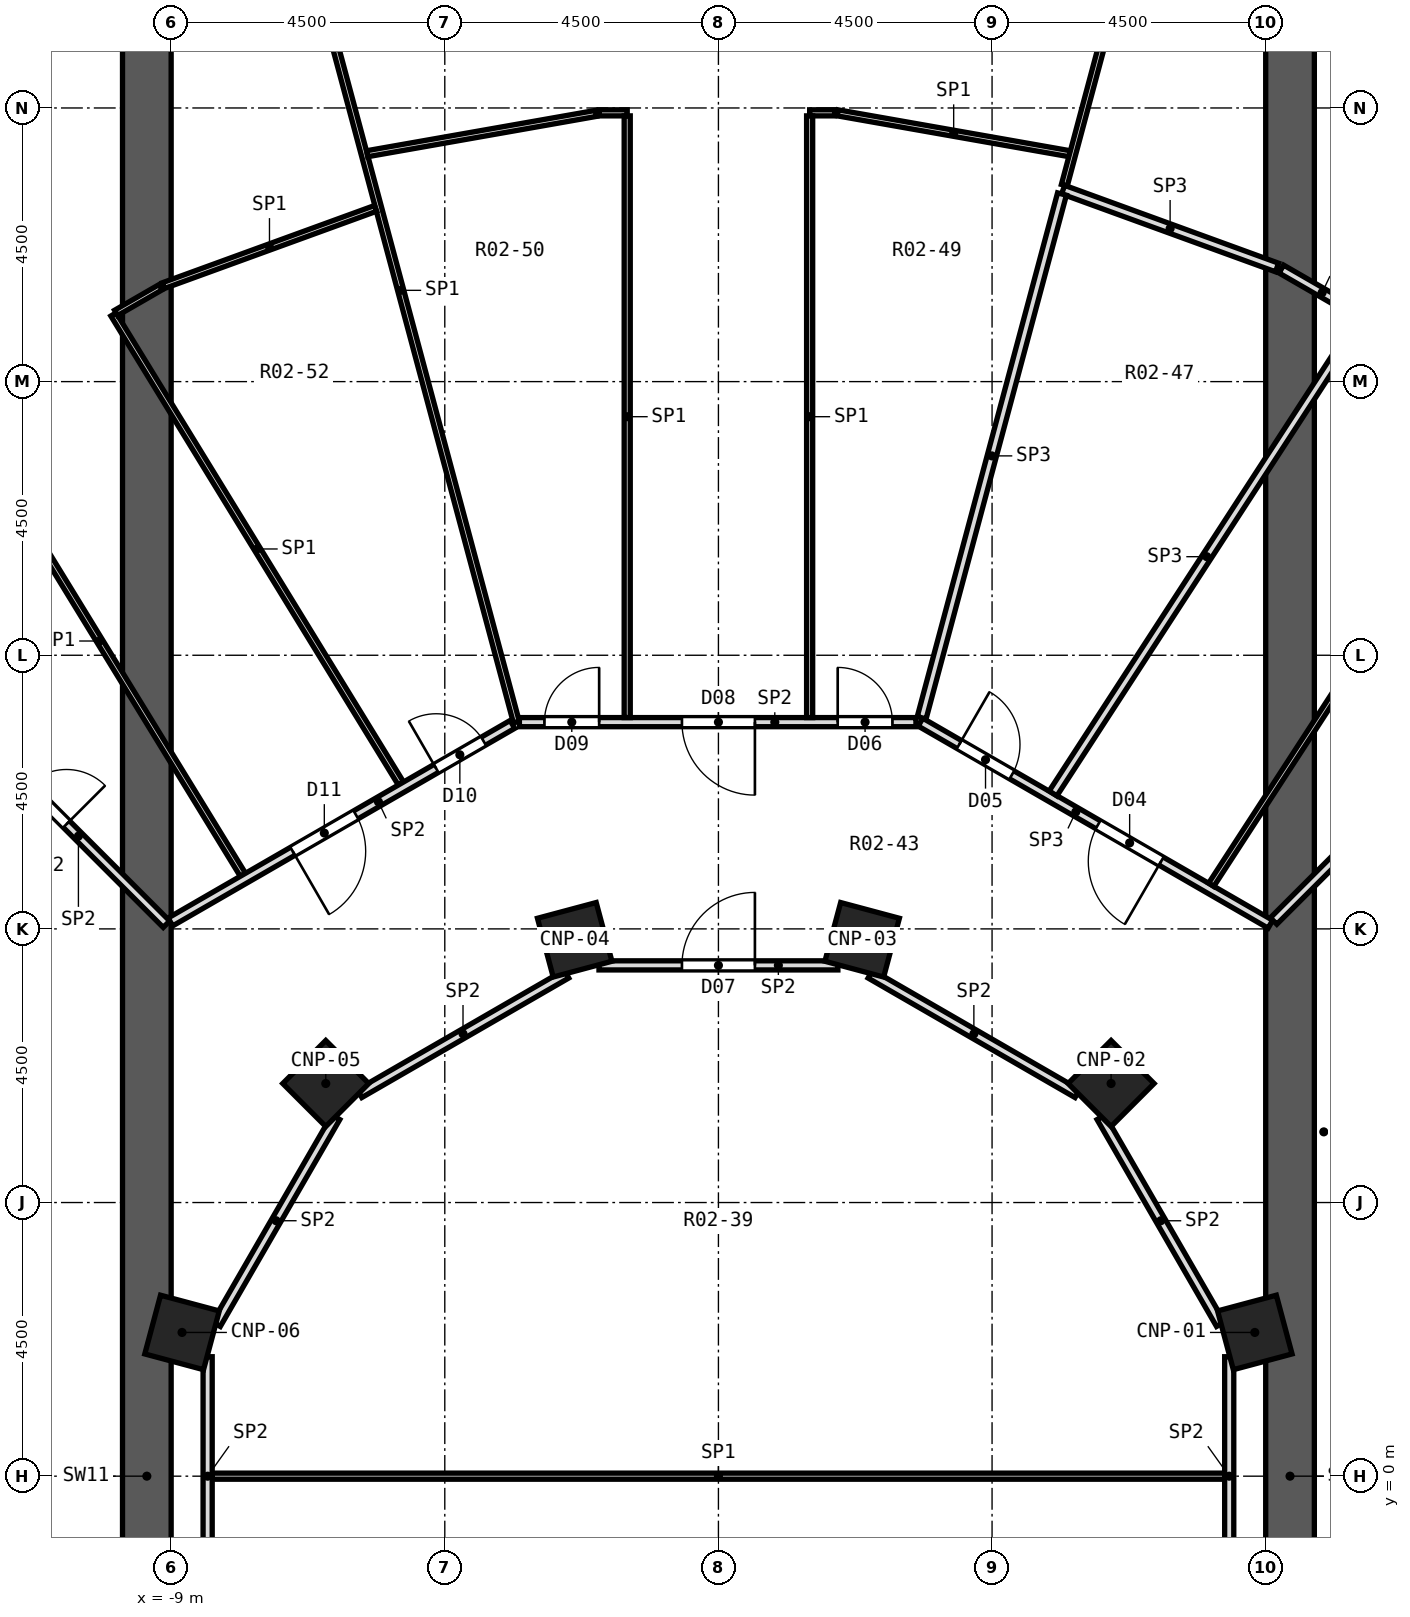
"""IFC4 building model, lengths in metres.
Left out: names, types, materials, properties, quantities, classifications, styles, units other than length and angle.
Written with IfcOpenShell. Run it as: python <this file> out.ifc"""

import sys

from ifc_helpers import new_model, si_unit, direction, frame, frame_2d, origin, origin_2d, place, context, subcontext, project, spatial, rectangle, extrude, element, fill, save


model = new_model("IFC4")
c1 = context("Model", 3, precision=1e-05, world=origin(), true_north=direction((0.0, 1.0)))
c2 = subcontext(c1, "Body", "Model", "MODEL_VIEW")
j1 = project(units=[si_unit("LENGTHUNIT", "METRE"), si_unit("PLANEANGLEUNIT", "RADIAN")], contexts=[c1])
p1 = place(None, origin())
s1 = spatial("IfcSite", under=j1, at=p1, CompositionType="ELEMENT")
p2 = place(p1, origin())
s2 = spatial("IfcBuilding", under=s1, at=p2, CompositionType="ELEMENT")
p3 = place(p2, frame((0.0, 0.0, -4.5)))
s3 = spatial("IfcBuildingStorey", under=s2, at=p3, CompositionType="ELEMENT", Elevation=-4.5)
for number, where, z_axis, x_axis in (
    (1, (8.821, 2.364, 0.0), (0.0, 0.0, 1.0), (0.966, 0.259, 0.0)),
    (2, (6.458, 6.458, 0.0), (0.0, 0.0, 1.0), (0.707, 0.707, 0.0)),
    (3, (2.364, 8.821, 0.0), (0.0, 0.0, 1.0), (0.259, 0.966, 0.0)),
    (4, (-2.364, 8.821, 0.0), (0.0, 0.0, 1.0), (-0.259, 0.966, 0.0)),
    (5, (-6.458, 6.458, 0.0), (0.0, 0.0, 1.0), (-0.707, 0.707, 0.0)),
    (6, (-8.821, 2.364, 0.0), (0.0, 0.0, 1.0), (-0.966, 0.259, 0.0)),
):
    element("IfcColumn", number, at=place(p3, frame(where, z_axis=z_axis, x_axis=x_axis)), inside=s3, PredefinedType="COLUMN", context=c2, shape_type="SweptSolid", body=[
        extrude(rectangle(XDim=1.0, YDim=1.0, at=origin_2d()), origin(), (0.0, 0.0, 1.0), 4.5),
    ])
for number, where, z_axis, x_axis in (
    (7, (9.4, -27.077, 0.0), (0.0, 0.0, 1.0), (0.0, 1.0, 0.0)),
    (8, (-9.4, -27.077, 0.0), (0.0, 0.0, 1.0), (0.0, 1.0, 0.0)),
):
    element("IfcWall", number, at=place(p3, frame(where, z_axis=z_axis, x_axis=x_axis)), inside=s3, PredefinedType="SHEAR", context=c2, shape_type="SweptSolid", body=[
        extrude(rectangle(XDim=54.154, YDim=0.8, at=frame_2d((27.077, 0.0))), origin(), (0.0, 0.0, 1.0), 4.5),
    ])
p4 = place(p3, frame((-7.128, 26.602, 0.0), z_axis=(0.0, 0.0, 1.0), x_axis=(0.258778692841, -0.965936637742, 0.0)))
e9 = element("IfcWall", 9, at=p4, inside=s3, PredefinedType="PARTITIONING", context=c2, shape_type="SweptSolid", body=[
    extrude(rectangle(XDim=14.702, YDim=0.1, at=frame_2d((7.351, 0.0))), origin(), (0.0, 0.0, 1.0), 3.95),
])
p5 = place(p3, frame((6.292, 5.902, 0.0), z_axis=(0.0, 0.0, 1.0), x_axis=(0.500061252887, -0.865990036525, 0.0)))
e10 = element("IfcWall", 10, at=p5, inside=s3, PredefinedType="PARTITIONING", context=c2, shape_type="SweptSolid", body=[
    extrude(rectangle(XDim=3.93, YDim=0.15, at=frame_2d((1.965, 0.0))), origin(), (0.0, 0.0, 1.0), 3.95),
])
p6 = place(p3, frame((-12.531, 17.578, 0.0), z_axis=(0.0, 0.0, 1.0), x_axis=(0.522457288025, -0.852665457368, 0.0)))
e11 = element("IfcWall", 11, at=p6, inside=s3, PredefinedType="PARTITIONING", context=c2, shape_type="SweptSolid", body=[
    extrude(rectangle(XDim=9.016, YDim=0.1, at=frame_2d((4.508, 0.0))), origin(), (0.0, 0.0, 1.0), 3.95),
])
p7 = place(p3, frame((-9.949, 19.105, 0.0), z_axis=(0.0, 0.0, 1.0), x_axis=(0.522544340664, -0.852612111127, 0.0)))
e12 = element("IfcWall", 12, at=p7, inside=s3, PredefinedType="PARTITIONING", context=c2, shape_type="SweptSolid", body=[
    extrude(rectangle(XDim=9.048, YDim=0.1, at=frame_2d((4.524, 0.0))), origin(), (0.0, 0.0, 1.0), 3.95),
])
p8 = place(p3, frame((-12.965, 12.965, 0.0), z_axis=(0.0, 0.0, 1.0), x_axis=(0.707106781187, -0.707106781187, 0.0)))
e13 = element("IfcWall", 13, at=p8, inside=s3, PredefinedType="PARTITIONING", context=c2, shape_type="SweptSolid", body=[
    extrude(rectangle(XDim=5.498, YDim=0.15, at=frame_2d((2.749, 0.0))), origin(), (0.0, 0.0, 1.0), 3.95),
])
p9 = place(p8, frame((2.272, 0.0, 0.0)))
e14 = element("IfcOpeningElement", 14, at=p9, cuts=e13, PredefinedType="OPENING", context=c2, shape_type="SweptSolid", body=[
    extrude(rectangle(XDim=0.9, YDim=2.1, at=frame_2d((0.45, 1.05))), frame((0.0, 0.087, 0.0), z_axis=(0.0, -1.0, 0.0), x_axis=(1.0, 0.0, 0.0)), (0.0, 0.0, 1.0), 0.174),
])
p10 = place(p3, frame((2.499, 8.257, 0.0), z_axis=(0.0, 0.0, 1.0), x_axis=(0.865990036525, -0.500061252887, 0.0)))
e15 = element("IfcWall", 15, at=p10, inside=s3, PredefinedType="PARTITIONING", context=c2, shape_type="SweptSolid", body=[
    extrude(rectangle(XDim=3.93, YDim=0.15, at=frame_2d((1.965, 0.0))), origin(), (0.0, 0.0, 1.0), 3.95),
])
p11 = place(p3, frame((3.323, 12.4, 0.0), z_axis=(0.0, 0.0, 1.0), x_axis=(0.865961614908, -0.500110469302, 0.0)))
e16 = element("IfcWall", 16, at=p11, inside=s3, PredefinedType="PARTITIONING", context=c2, shape_type="SweptSolid", body=[
    extrude(rectangle(XDim=6.645, YDim=0.15, at=frame_2d((3.322, 0.0))), origin(), (0.0, 0.0, 1.0), 3.95),
])
p12 = place(p11, frame((3.372, 0.0, 0.0)))
e17 = element("IfcOpeningElement", 17, at=p12, cuts=e16, PredefinedType="OPENING", context=c2, shape_type="SweptSolid", body=[
    extrude(rectangle(XDim=1.2, YDim=2.1, at=frame_2d((0.6, 1.05))), frame((0.0, 0.087, 0.0), z_axis=(0.0, -1.0, 0.0), x_axis=(1.0, 0.0, 0.0)), (0.0, 0.0, 1.0), 0.174),
])
p13 = place(p11, frame((0.735, 0.0, 0.0)))
e18 = element("IfcOpeningElement", 18, at=p13, cuts=e16, PredefinedType="OPENING", context=c2, shape_type="SweptSolid", body=[
    extrude(rectangle(XDim=1.0, YDim=2.1, at=frame_2d((0.5, 1.05))), frame((0.0, 0.087, 0.0), z_axis=(0.0, -1.0, 0.0), x_axis=(1.0, 0.0, 0.0)), (0.0, 0.0, 1.0), 0.174),
])
p14 = place(p3, frame((9.257, 19.851, 0.0), z_axis=(0.0, 0.0, 1.0), x_axis=(0.866093831647, -0.499881460731, 0.0)))
e19 = element("IfcWall", 19, at=p14, inside=s3, PredefinedType="PARTITIONING", context=c2, shape_type="SweptSolid", body=[
    extrude(rectangle(XDim=1.551, YDim=0.15, at=frame_2d((0.775, 0.0))), origin(), (0.0, 0.0, 1.0), 3.95),
])
p15 = place(p3, frame((5.669, 21.157, 0.0), z_axis=(0.0, 0.0, 1.0), x_axis=(0.939694363407, -0.342015355476, 0.0)))
e20 = element("IfcWall", 20, at=p15, inside=s3, PredefinedType="PARTITIONING", context=c2, shape_type="SweptSolid", body=[
    extrude(rectangle(XDim=3.743, YDim=0.15, at=frame_2d((1.872, 0.0))), origin(), (0.0, 0.0, 1.0), 3.95),
])
p16 = place(p3, frame((1.961, 22.42, 0.0), z_axis=(0.0, 0.0, 1.0), x_axis=(0.984830477475, -0.173519251487, 0.0)))
e21 = element("IfcWall", 21, at=p16, inside=s3, PredefinedType="PARTITIONING", context=c2, shape_type="SweptSolid", body=[
    extrude(rectangle(XDim=3.874, YDim=0.1, at=frame_2d((1.937, 0.0))), origin(), (0.0, 0.0, 1.0), 3.95),
])
p17 = place(p3, frame((-8.325, 0.0, 0.0), z_axis=(0.0, 0.0, 1.0), x_axis=(1.0, 0.0, 0.0)))
e22 = element("IfcWall", 22, at=p17, inside=s3, PredefinedType="PARTITIONING", context=c2, shape_type="SweptSolid", body=[
    extrude(rectangle(XDim=16.65, YDim=0.1, at=frame_2d((8.325, 0.0))), origin(), (0.0, 0.0, 1.0), 3.95),
])
p18 = place(p3, frame((-1.964, 8.4, 0.0), z_axis=(0.0, 0.0, 1.0), x_axis=(1.0, 0.0, 0.0)))
e23 = element("IfcWall", 23, at=p18, inside=s3, PredefinedType="PARTITIONING", context=c2, shape_type="SweptSolid", body=[
    extrude(rectangle(XDim=3.929, YDim=0.15, at=frame_2d((1.964, 0.0))), origin(), (0.0, 0.0, 1.0), 3.95),
])
p19 = place(p18, frame((1.365, 0.0, 0.0)))
e24 = element("IfcOpeningElement", 24, at=p19, cuts=e23, PredefinedType="OPENING", context=c2, shape_type="SweptSolid", body=[
    extrude(rectangle(XDim=1.2, YDim=2.1, at=frame_2d((0.6, 1.05))), frame((0.0, 0.087, 0.0), z_axis=(0.0, -1.0, 0.0), x_axis=(1.0, 0.0, 0.0)), (0.0, 0.0, 1.0), 0.174),
])
p20 = place(p3, frame((-3.273, 12.4, 0.0), z_axis=(0.0, 0.0, 1.0), x_axis=(1.0, 0.0, 0.0)))
e25 = element("IfcWall", 25, at=p20, inside=s3, PredefinedType="PARTITIONING", context=c2, shape_type="SweptSolid", body=[
    extrude(rectangle(XDim=6.521, YDim=0.15, at=frame_2d((3.26, 0.0))), origin(), (0.0, 0.0, 1.0), 3.95),
])
p21 = place(p20, frame((5.235, 0.0, 0.0)))
e26 = element("IfcOpeningElement", 26, at=p21, cuts=e25, PredefinedType="OPENING", context=c2, shape_type="SweptSolid", body=[
    extrude(rectangle(XDim=0.9, YDim=2.1, at=frame_2d((0.45, 1.05))), frame((0.0, 0.087, 0.0), z_axis=(0.0, -1.0, 0.0), x_axis=(1.0, 0.0, 0.0)), (0.0, 0.0, 1.0), 0.174),
])
p22 = place(p20, frame((2.673, 0.0, 0.0)))
e27 = element("IfcOpeningElement", 27, at=p22, cuts=e25, PredefinedType="OPENING", context=c2, shape_type="SweptSolid", body=[
    extrude(rectangle(XDim=1.2, YDim=2.1, at=frame_2d((0.6, 1.05))), frame((0.0, 0.087, 0.0), z_axis=(0.0, -1.0, 0.0), x_axis=(1.0, 0.0, 0.0)), (0.0, 0.0, 1.0), 0.174),
])
p23 = place(p20, frame((0.412, 0.0, 0.0)))
e28 = element("IfcOpeningElement", 28, at=p23, cuts=e25, PredefinedType="OPENING", context=c2, shape_type="SweptSolid", body=[
    extrude(rectangle(XDim=0.9, YDim=2.1, at=frame_2d((0.45, 1.05))), frame((0.0, 0.087, 0.0), z_axis=(0.0, -1.0, 0.0), x_axis=(1.0, 0.0, 0.0)), (0.0, 0.0, 1.0), 0.174),
])
p24 = place(p3, frame((-1.961, 22.42, 0.0), z_axis=(0.0, 0.0, 1.0), x_axis=(1.0, 0.0, 0.0)))
e29 = element("IfcWall", 29, at=p24, inside=s3, PredefinedType="PARTITIONING", context=c2, shape_type="SweptSolid", body=[
    extrude(rectangle(XDim=0.461, YDim=0.1, at=frame_2d((0.23, 0.0))), origin(), (0.0, 0.0, 1.0), 3.95),
])
p25 = place(p3, frame((1.5, 22.42, 0.0), z_axis=(0.0, 0.0, 1.0), x_axis=(1.0, 0.0, 0.0)))
e30 = element("IfcWall", 30, at=p25, inside=s3, PredefinedType="PARTITIONING", context=c2, shape_type="SweptSolid", body=[
    extrude(rectangle(XDim=0.411, YDim=0.1, at=frame_2d((0.206, 0.0))), origin(), (0.0, 0.0, 1.0), 3.95),
])
p26 = place(p3, frame((-5.776, 21.748, 0.0), z_axis=(0.0, 0.0, 1.0), x_axis=(0.984825953453, 0.173544926186, 0.0)))
e31 = element("IfcWall", 31, at=p26, inside=s3, PredefinedType="PARTITIONING", context=c2, shape_type="SweptSolid", body=[
    extrude(rectangle(XDim=3.824, YDim=0.1, at=frame_2d((1.912, 0.0))), origin(), (0.0, 0.0, 1.0), 3.95),
])
p27 = place(p3, frame((-9.129, 19.578, 0.0), z_axis=(0.0, 0.0, 1.0), x_axis=(0.939651350788, 0.342133510435, 0.0)))
e32 = element("IfcWall", 32, at=p27, inside=s3, PredefinedType="PARTITIONING", context=c2, shape_type="SweptSolid", body=[
    extrude(rectangle(XDim=3.715, YDim=0.1, at=frame_2d((1.857, 0.0))), origin(), (0.0, 0.0, 1.0), 3.95),
])
p28 = place(p3, frame((-5.902, 6.292, 0.0), z_axis=(0.0, 0.0, 1.0), x_axis=(0.865990036525, 0.500061252887, 0.0)))
e33 = element("IfcWall", 33, at=p28, inside=s3, PredefinedType="PARTITIONING", context=c2, shape_type="SweptSolid", body=[
    extrude(rectangle(XDim=3.93, YDim=0.15, at=frame_2d((1.965, 0.0))), origin(), (0.0, 0.0, 1.0), 3.95),
])
p29 = place(p3, frame((-9.012, 9.115, 0.0), z_axis=(0.0, 0.0, 1.0), x_axis=(0.865967095912, 0.5001009786, 0.0)))
e34 = element("IfcWall", 34, at=p29, inside=s3, PredefinedType="PARTITIONING", context=c2, shape_type="SweptSolid", body=[
    extrude(rectangle(XDim=6.495, YDim=0.15, at=frame_2d((3.248, 0.0))), origin(), (0.0, 0.0, 1.0), 3.95),
])
p30 = place(p29, frame((5.046, 0.0, 0.0)))
e35 = element("IfcOpeningElement", 35, at=p30, cuts=e34, PredefinedType="OPENING", context=c2, shape_type="SweptSolid", body=[
    extrude(rectangle(XDim=0.9, YDim=2.1, at=frame_2d((0.45, 1.05))), frame((0.0, 0.087, 0.0), z_axis=(0.0, -1.0, 0.0), x_axis=(1.0, 0.0, 0.0)), (0.0, 0.0, 1.0), 0.174),
])
p31 = place(p29, frame((2.323, 0.0, 0.0)))
e36 = element("IfcOpeningElement", 36, at=p31, cuts=e34, PredefinedType="OPENING", context=c2, shape_type="SweptSolid", body=[
    extrude(rectangle(XDim=1.2, YDim=2.1, at=frame_2d((0.6, 1.05))), frame((0.0, 0.087, 0.0), z_axis=(0.0, -1.0, 0.0), x_axis=(1.0, 0.0, 0.0)), (0.0, 0.0, 1.0), 0.174),
])
p32 = place(p3, frame((-9.906, 19.13, 0.0), z_axis=(0.0, 0.0, 1.0), x_axis=(0.866195186797, 0.499705811824, 0.0)))
e37 = element("IfcWall", 37, at=p32, inside=s3, PredefinedType="PARTITIONING", context=c2, shape_type="SweptSolid", body=[
    extrude(rectangle(XDim=0.847, YDim=0.1, at=frame_2d((0.423, 0.0))), origin(), (0.0, 0.0, 1.0), 3.95),
])
p33 = place(p3, frame((9.13, 9.13, 0.0), z_axis=(0.0, 0.0, 1.0), x_axis=(0.707106781187, 0.707106781187, 0.0)))
e38 = element("IfcWall", 38, at=p33, inside=s3, PredefinedType="PARTITIONING", context=c2, shape_type="SweptSolid", body=[
    extrude(rectangle(XDim=5.423, YDim=0.15, at=frame_2d((2.711, 0.0))), origin(), (0.0, 0.0, 1.0), 3.95),
])
p34 = place(p33, frame((2.251, 0.0, 0.0)))
e39 = element("IfcOpeningElement", 39, at=p34, cuts=e38, PredefinedType="OPENING", context=c2, shape_type="SweptSolid", body=[
    extrude(rectangle(XDim=0.9, YDim=2.1, at=frame_2d((0.45, 1.05))), frame((0.0, 0.087, 0.0), z_axis=(0.0, -1.0, 0.0), x_axis=(1.0, 0.0, 0.0)), (0.0, 0.0, 1.0), 0.174),
])
p35 = place(p3, frame((8.104, 9.725, 0.0), z_axis=(0.0, 0.0, 1.0), x_axis=(0.544649902599, 0.838663510354, 0.0)))
e40 = element("IfcWall", 40, at=p35, inside=s3, PredefinedType="PARTITIONING", context=c2, shape_type="SweptSolid", body=[
    extrude(rectangle(XDim=9.18, YDim=0.1, at=frame_2d((4.59, 0.0))), origin(), (0.0, 0.0, 1.0), 3.95),
])
p36 = place(p3, frame((5.503, 11.228, 0.0), z_axis=(0.0, 0.0, 1.0), x_axis=(0.5446582962, 0.838658059271, 0.0)))
e41 = element("IfcWall", 41, at=p36, inside=s3, PredefinedType="PARTITIONING", context=c2, shape_type="SweptSolid", body=[
    extrude(rectangle(XDim=9.283, YDim=0.15, at=frame_2d((4.642, 0.0))), origin(), (0.0, 0.0, 1.0), 3.95),
])
p37 = place(p3, frame((-8.257, 2.499, 0.0), z_axis=(0.0, 0.0, 1.0), x_axis=(0.500061252887, 0.865990036525, 0.0)))
e42 = element("IfcWall", 42, at=p37, inside=s3, PredefinedType="PARTITIONING", context=c2, shape_type="SweptSolid", body=[
    extrude(rectangle(XDim=3.93, YDim=0.15, at=frame_2d((1.965, 0.0))), origin(), (0.0, 0.0, 1.0), 3.95),
])
p38 = place(p3, frame((5.688, 21.229, 0.0), z_axis=(0.0, 0.0, 1.0), x_axis=(0.258820927891, 0.965925321796, 0.0)))
e43 = element("IfcWall", 43, at=p38, inside=s3, PredefinedType="PARTITIONING", context=c2, shape_type="SweptSolid", body=[
    extrude(rectangle(XDim=5.562, YDim=0.1, at=frame_2d((2.781, 0.0))), origin(), (0.0, 0.0, 1.0), 3.95),
])
p39 = place(p3, frame((3.342, 12.472, 0.0), z_axis=(0.0, 0.0, 1.0), x_axis=(0.258789007971, 0.965933874214, 0.0)))
e44 = element("IfcWall", 44, at=p39, inside=s3, PredefinedType="PARTITIONING", context=c2, shape_type="SweptSolid", body=[
    extrude(rectangle(XDim=8.916, YDim=0.15, at=frame_2d((4.458, 0.0))), origin(), (0.0, 0.0, 1.0), 3.95),
])
p40 = place(p3, frame((8.4, -1.964, 0.0), z_axis=(0.0, 0.0, 1.0), x_axis=(0.0, 1.0, 0.0)))
e45 = element("IfcWall", 45, at=p40, inside=s3, PredefinedType="PARTITIONING", context=c2, shape_type="SweptSolid", body=[
    extrude(rectangle(XDim=3.929, YDim=0.15, at=frame_2d((1.964, 0.0))), origin(), (0.0, 0.0, 1.0), 3.95),
])
for number, where, z_axis, x_axis in (
    (46, (1.5, 12.475, 0.0), (0.0, 0.0, 1.0), (0.0, 1.0, 0.0)),
    (47, (-1.5, 12.475, 0.0), (0.0, 0.0, 1.0), (0.0, 1.0, 0.0)),
):
    element("IfcWall", number, at=place(p3, frame(where, z_axis=z_axis, x_axis=x_axis)), inside=s3, PredefinedType="PARTITIONING", context=c2, shape_type="SweptSolid", body=[
        extrude(rectangle(XDim=9.895, YDim=0.1, at=frame_2d((4.948, 0.0))), origin(), (0.0, 0.0, 1.0), 3.95),
    ])
p41 = place(p3, frame((-8.4, -1.964, 0.0), z_axis=(0.0, 0.0, 1.0), x_axis=(0.0, 1.0, 0.0)))
e48 = element("IfcWall", 48, at=p41, inside=s3, PredefinedType="PARTITIONING", context=c2, shape_type="SweptSolid", body=[
    extrude(rectangle(XDim=3.929, YDim=0.15, at=frame_2d((1.964, 0.0))), origin(), (0.0, 0.0, 1.0), 3.95),
])
p42 = place(p12, frame((1.2, 0.0, 0.0), z_axis=(0.0, 0.0, 1.0), x_axis=(-1.0, 0.0, 0.0)))
e49 = element("IfcDoor", 49, at=p42, inside=s3, OperationType="SINGLE_SWING_LEFT", PredefinedType="DOOR", context=c2, shape_type="SweptSolid", body=[
    extrude(rectangle(XDim=1.2, YDim=2.1, at=frame_2d((0.6, 1.05))), frame((0.0, 0.025, 0.0), z_axis=(0.0, -1.0, 0.0), x_axis=(1.0, 0.0, 0.0)), (0.0, 0.0, 1.0), 0.05),
])
fill(e17, e49)
p43 = place(p13, origin())
e50 = element("IfcDoor", 50, at=p43, inside=s3, OperationType="SINGLE_SWING_LEFT", PredefinedType="DOOR", context=c2, shape_type="SweptSolid", body=[
    extrude(rectangle(XDim=1.0, YDim=2.1, at=frame_2d((0.5, 1.05))), frame((0.0, 0.025, 0.0), z_axis=(0.0, -1.0, 0.0), x_axis=(1.0, 0.0, 0.0)), (0.0, 0.0, 1.0), 0.05),
])
fill(e18, e50)
p44 = place(p21, origin())
e51 = element("IfcDoor", 51, at=p44, inside=s3, OperationType="SINGLE_SWING_LEFT", PredefinedType="DOOR", context=c2, shape_type="SweptSolid", body=[
    extrude(rectangle(XDim=0.9, YDim=2.1, at=frame_2d((0.45, 1.05))), frame((0.0, 0.025, 0.0), z_axis=(0.0, -1.0, 0.0), x_axis=(1.0, 0.0, 0.0)), (0.0, 0.0, 1.0), 0.05),
])
fill(e26, e51)
p45 = place(p19, origin())
e52 = element("IfcDoor", 52, at=p45, inside=s3, OperationType="SINGLE_SWING_RIGHT", PredefinedType="DOOR", context=c2, shape_type="SweptSolid", body=[
    extrude(rectangle(XDim=1.2, YDim=2.1, at=frame_2d((0.6, 1.05))), frame((0.0, 0.025, 0.0), z_axis=(0.0, -1.0, 0.0), x_axis=(1.0, 0.0, 0.0)), (0.0, 0.0, 1.0), 0.05),
])
fill(e24, e52)
p46 = place(p22, frame((1.2, 0.0, 0.0), z_axis=(0.0, 0.0, 1.0), x_axis=(-1.0, 0.0, 0.0)))
e53 = element("IfcDoor", 53, at=p46, inside=s3, OperationType="SINGLE_SWING_LEFT", PredefinedType="DOOR", context=c2, shape_type="SweptSolid", body=[
    extrude(rectangle(XDim=1.2, YDim=2.1, at=frame_2d((0.6, 1.05))), frame((0.0, 0.025, 0.0), z_axis=(0.0, -1.0, 0.0), x_axis=(1.0, 0.0, 0.0)), (0.0, 0.0, 1.0), 0.05),
])
fill(e27, e53)
p47 = place(p23, origin())
e54 = element("IfcDoor", 54, at=p47, inside=s3, OperationType="SINGLE_SWING_RIGHT", PredefinedType="DOOR", context=c2, shape_type="SweptSolid", body=[
    extrude(rectangle(XDim=0.9, YDim=2.1, at=frame_2d((0.45, 1.05))), frame((0.0, 0.025, 0.0), z_axis=(0.0, -1.0, 0.0), x_axis=(1.0, 0.0, 0.0)), (0.0, 0.0, 1.0), 0.05),
])
fill(e28, e54)
p48 = place(p30, origin())
e55 = element("IfcDoor", 55, at=p48, inside=s3, OperationType="SINGLE_SWING_LEFT", PredefinedType="DOOR", context=c2, shape_type="SweptSolid", body=[
    extrude(rectangle(XDim=0.9, YDim=2.1, at=frame_2d((0.45, 1.05))), frame((0.0, 0.025, 0.0), z_axis=(0.0, -1.0, 0.0), x_axis=(1.0, 0.0, 0.0)), (0.0, 0.0, 1.0), 0.05),
])
fill(e35, e55)
p49 = place(p31, frame((1.2, 0.0, 0.0), z_axis=(0.0, 0.0, 1.0), x_axis=(-1.0, 0.0, 0.0)))
e56 = element("IfcDoor", 56, at=p49, inside=s3, OperationType="SINGLE_SWING_RIGHT", PredefinedType="DOOR", context=c2, shape_type="SweptSolid", body=[
    extrude(rectangle(XDim=1.2, YDim=2.1, at=frame_2d((0.6, 1.05))), frame((0.0, 0.025, 0.0), z_axis=(0.0, -1.0, 0.0), x_axis=(1.0, 0.0, 0.0)), (0.0, 0.0, 1.0), 0.05),
])
fill(e36, e56)
p50 = place(p9, origin())
e57 = element("IfcDoor", 57, at=p50, inside=s3, OperationType="SINGLE_SWING_RIGHT", PredefinedType="DOOR", context=c2, shape_type="SweptSolid", body=[
    extrude(rectangle(XDim=0.9, YDim=2.1, at=frame_2d((0.45, 1.05))), frame((0.0, 0.025, 0.0), z_axis=(0.0, -1.0, 0.0), x_axis=(1.0, 0.0, 0.0)), (0.0, 0.0, 1.0), 0.05),
])
fill(e14, e57)
save(model, sys.argv[1])
